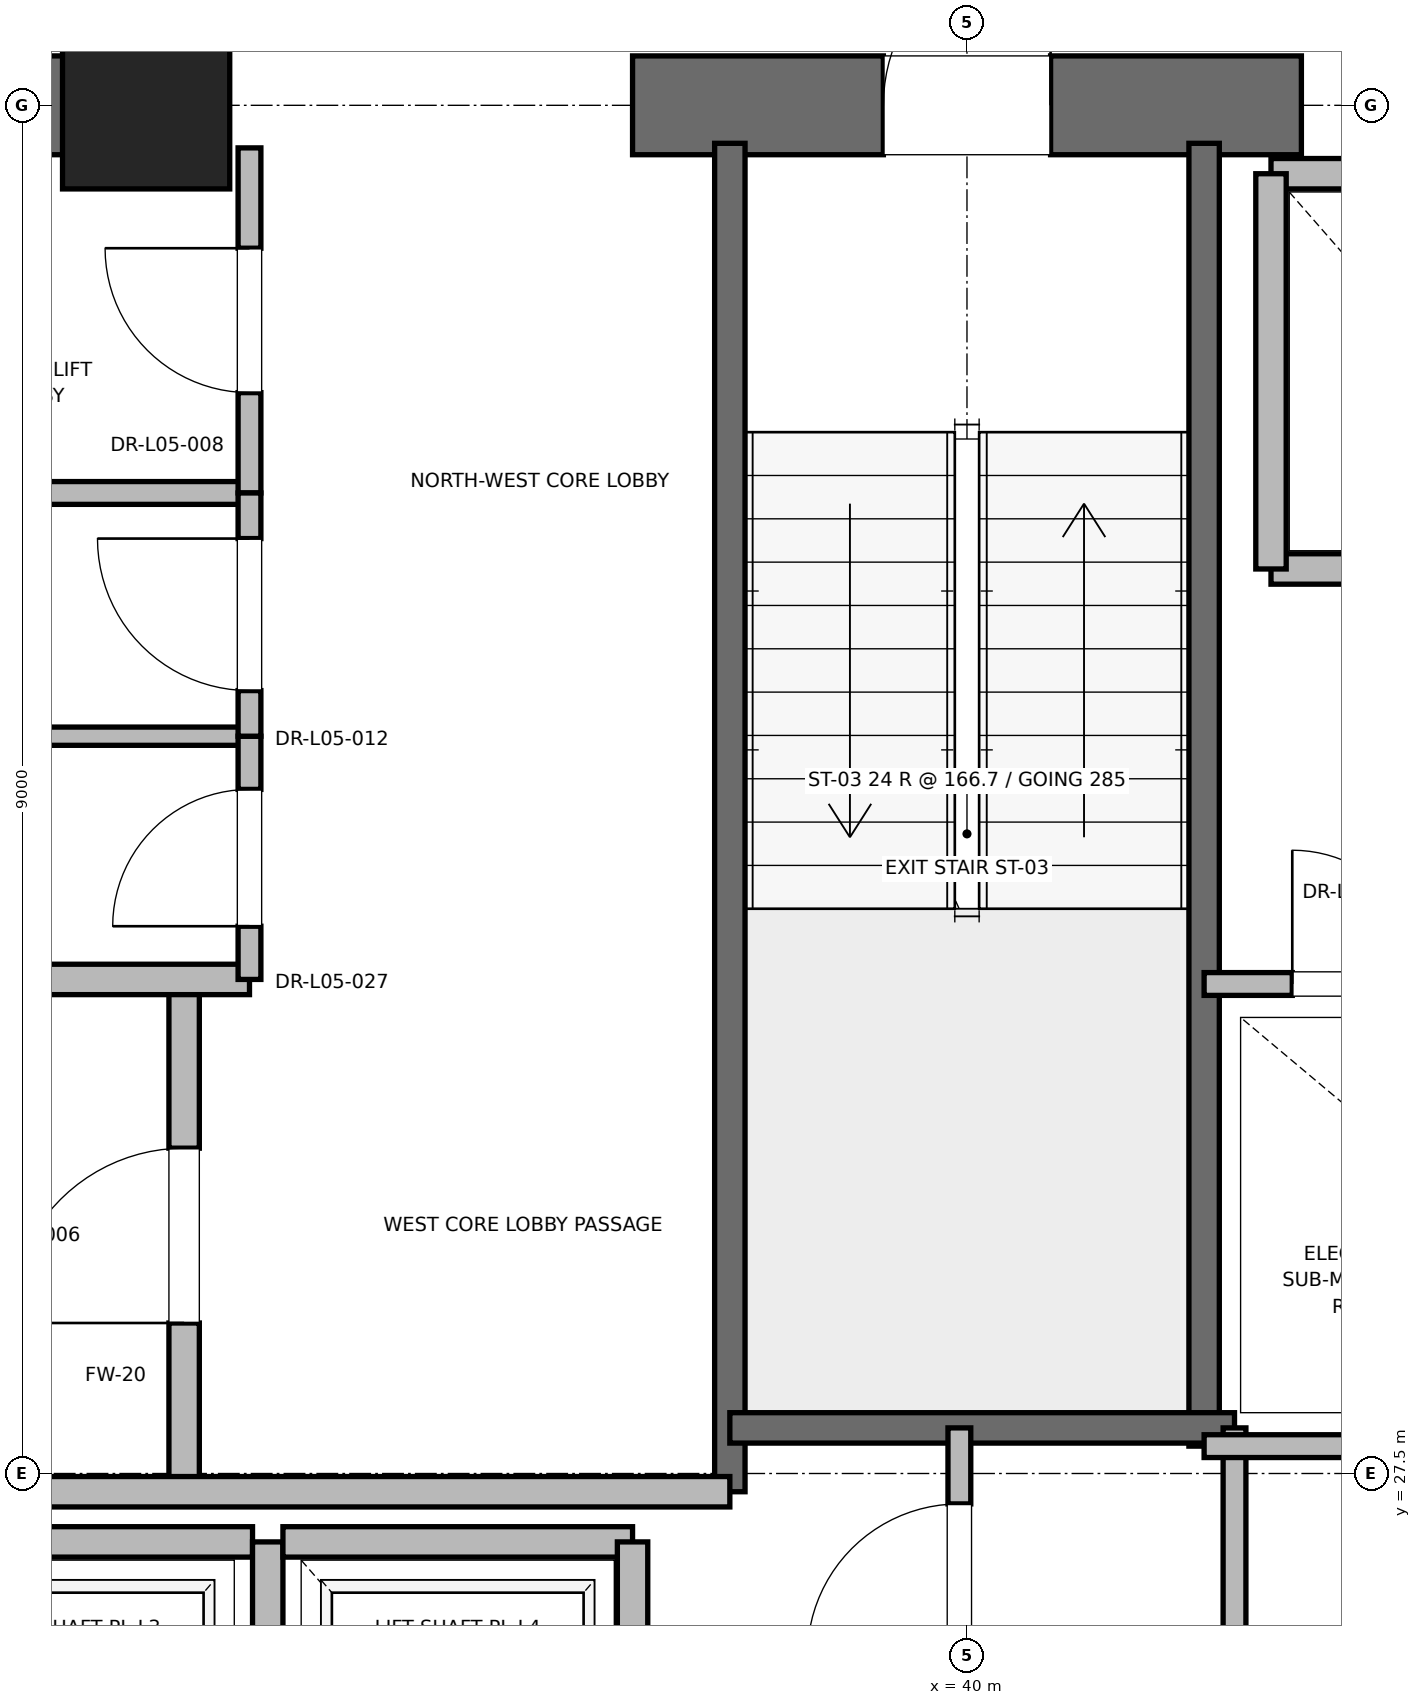
"""IFC4 building model, lengths in metres.
Left out: names, types, materials, properties, quantities, classifications, styles, units other than length and angle.
Written with IfcOpenShell. Run it as: python <this file> out.ifc"""

import sys

from ifc_helpers import new_model, si_unit, direction, frame, frame_2d, origin, origin_2d, place, context, subcontext, project, spatial, rectangle, extrude, element, fill, save


model = new_model("IFC4")
c1 = context("Model", 3, precision=1e-05, world=origin(), true_north=direction((0.0, 1.0)))
c2 = subcontext(c1, "Body", "Model", "MODEL_VIEW")
j1 = project(units=[si_unit("LENGTHUNIT", "METRE"), si_unit("PLANEANGLEUNIT", "RADIAN")], contexts=[c1])
p1 = place(None, origin())
s1 = spatial("IfcSite", under=j1, at=p1, CompositionType="ELEMENT")
p2 = place(p1, origin())
s2 = spatial("IfcBuilding", under=s1, at=p2, CompositionType="ELEMENT")
p3 = place(p2, frame((0.0, 0.0, 27.6)))
s3 = spatial("IfcBuildingStorey", under=s2, at=p3, CompositionType="ELEMENT", Elevation=27.6)
p4 = place(p3, frame((34.6, 36.5, 0.0), z_axis=(0.0, 0.0, 1.0), x_axis=(1.0, 0.0, 0.0)))
e1 = element("IfcColumn", 1, at=p4, inside=s3, PredefinedType="PILASTER", context=c2, shape_type="SweptSolid", body=[
    extrude(rectangle(XDim=1.1, YDim=1.1, at=origin_2d()), origin(), (0.0, 0.0, 1.0), 4.0),
])
p5 = place(p3, frame((29.0, 36.5, 0.0), z_axis=(0.0, 0.0, 1.0), x_axis=(1.0, 0.0, 0.0)))
e2 = element("IfcWall", 2, at=p5, inside=s3, PredefinedType="SHEAR", context=c2, shape_type="SweptSolid", body=[
    extrude(rectangle(XDim=5.8, YDim=0.65, at=frame_2d((2.9, 0.0))), origin(), (0.0, 0.0, 1.0), 3.76),
])
p6 = place(p3, frame((37.8, 36.5, 0.0), z_axis=(0.0, 0.0, 1.0), x_axis=(1.0, 0.0, 0.0)))
e3 = element("IfcWall", 3, at=p6, inside=s3, PredefinedType="SHEAR", context=c2, shape_type="SweptSolid", body=[
    extrude(rectangle(XDim=4.4, YDim=0.65, at=frame_2d((2.2, 0.0))), origin(), (0.0, 0.0, 1.0), 3.76),
])
p7 = place(p6, frame((1.65, 0.0, 0.0)))
e4 = element("IfcOpeningElement", 4, at=p7, cuts=e3, PredefinedType="OPENING", context=c2, shape_type="SweptSolid", body=[
    extrude(rectangle(XDim=1.1, YDim=2.15, at=frame_2d((0.55, 1.075))), frame((0.0, 0.325, 0.0), z_axis=(0.0, -1.0, 0.0), x_axis=(1.0, 0.0, 0.0)), (0.0, 0.0, 1.0), 0.65),
])
p8 = place(p3, frame((38.44, 27.38, 0.0), z_axis=(0.0, 0.0, 1.0), x_axis=(0.0, 1.0, 0.0)))
e5 = element("IfcWall", 5, at=p8, inside=s3, PredefinedType="SOLIDWALL", context=c2, shape_type="SweptSolid", body=[
    extrude(rectangle(XDim=8.87, YDim=0.2, at=frame_2d((4.435, 0.0))), origin(), (0.0, 0.0, 1.0), 3.76),
])
p9 = place(p3, frame((41.56, 27.68, 0.0), z_axis=(0.0, 0.0, 1.0), x_axis=(0.0, 1.0, 0.0)))
e6 = element("IfcWall", 6, at=p9, inside=s3, PredefinedType="SOLIDWALL", context=c2, shape_type="SweptSolid", body=[
    extrude(rectangle(XDim=8.57, YDim=0.2, at=frame_2d((4.285, 0.0))), origin(), (0.0, 0.0, 1.0), 3.76),
])
p10 = place(p3, frame((38.44, 27.8, 0.0), z_axis=(0.0, 0.0, 1.0), x_axis=(1.0, 0.0, 0.0)))
e7 = element("IfcWall", 7, at=p10, inside=s3, PredefinedType="SOLIDWALL", context=c2, shape_type="SweptSolid", body=[
    extrude(rectangle(XDim=3.32, YDim=0.2, at=frame_2d((1.66, 0.0))), origin(), (0.0, 0.0, 1.0), 3.76),
])
p11 = place(p3, frame((34.85, 27.38, 0.0), z_axis=(0.0, 0.0, 1.0), x_axis=(0.0, 1.0, 0.0)))
e8 = element("IfcWall", 8, at=p11, inside=s3, PredefinedType="PARTITIONING", context=c2, shape_type="SweptSolid", body=[
    extrude(rectangle(XDim=3.37, YDim=0.2, at=frame_2d((1.685, 0.0))), origin(), (0.0, 0.0, 1.0), 3.76),
])
p12 = place(p11, frame((1.11, 0.0, 0.0)))
e9 = element("IfcOpeningElement", 9, at=p12, cuts=e8, PredefinedType="OPENING", context=c2, shape_type="SweptSolid", body=[
    extrude(rectangle(XDim=1.15, YDim=2.2, at=frame_2d((0.575, 1.1))), frame((0.0, 0.1, 0.0), z_axis=(0.0, -1.0, 0.0), x_axis=(1.0, 0.0, 0.0)), (0.0, 0.0, 1.0), 0.2),
])
p13 = place(p3, frame((32.82, 27.38, 0.0), z_axis=(0.0, 0.0, 1.0), x_axis=(1.0, 0.0, 0.0)))
e10 = element("IfcWall", 10, at=p13, inside=s3, PredefinedType="PARTITIONING", context=c2, shape_type="SweptSolid", body=[
    extrude(rectangle(XDim=5.62, YDim=0.2, at=frame_2d((2.81, 0.0))), origin(), (0.0, 0.0, 1.0), 3.76),
])
p14 = place(p3, frame((32.15, 30.75, 0.0), z_axis=(0.0, 0.0, 1.0), x_axis=(1.0, 0.0, 0.0)))
e11 = element("IfcWall", 11, at=p14, inside=s3, PredefinedType="PARTITIONING", context=c2, shape_type="SweptSolid", body=[
    extrude(rectangle(XDim=3.13, YDim=0.2, at=frame_2d((1.565, 0.0))), origin(), (0.0, 0.0, 1.0), 3.76),
])
p15 = place(p3, frame((35.3, 27.05, 0.0), z_axis=(0.0, 0.0, 1.0), x_axis=(-1.0, 0.0, 0.0)))
e12 = element("IfcWall", 12, at=p15, inside=s3, PredefinedType="SOLIDWALL", context=c2, shape_type="SweptSolid", body=[
    extrude(rectangle(XDim=2.3, YDim=0.2, at=frame_2d((1.15, 0.0))), origin(), (0.0, 0.0, 1.0), 3.76),
])
p16 = place(p3, frame((35.4, 24.45, 0.0), z_axis=(0.0, 0.0, 1.0), x_axis=(0.0, 1.0, 0.0)))
e13 = element("IfcWall", 13, at=p16, inside=s3, PredefinedType="SOLIDWALL", context=c2, shape_type="SweptSolid", body=[
    extrude(rectangle(XDim=2.6, YDim=0.2, at=frame_2d((1.3, 0.0))), origin(), (0.0, 0.0, 1.0), 3.76),
])
p17 = place(p3, frame((37.8, 27.05, 0.0), z_axis=(0.0, 0.0, 1.0), x_axis=(-1.0, 0.0, 0.0)))
e14 = element("IfcWall", 14, at=p17, inside=s3, PredefinedType="SOLIDWALL", context=c2, shape_type="SweptSolid", body=[
    extrude(rectangle(XDim=2.3, YDim=0.2, at=frame_2d((1.15, 0.0))), origin(), (0.0, 0.0, 1.0), 3.76),
])
p18 = place(p3, frame((37.8, 24.45, 0.0), z_axis=(0.0, 0.0, 1.0), x_axis=(0.0, 1.0, 0.0)))
e15 = element("IfcWall", 15, at=p18, inside=s3, PredefinedType="SOLIDWALL", context=c2, shape_type="SweptSolid", body=[
    extrude(rectangle(XDim=2.6, YDim=0.2, at=frame_2d((1.3, 0.0))), origin(), (0.0, 0.0, 1.0), 3.76),
])
p19 = place(p3, frame((42.0, 33.45, 0.0), z_axis=(0.0, 0.0, 1.0), x_axis=(1.0, 0.0, 0.0)))
e16 = element("IfcWall", 16, at=p19, inside=s3, PredefinedType="SOLIDWALL", context=c2, shape_type="SweptSolid", body=[
    extrude(rectangle(XDim=2.3, YDim=0.2, at=frame_2d((1.15, 0.0))), origin(), (0.0, 0.0, 1.0), 3.76),
])
p20 = place(p3, frame((44.3, 36.05, 0.0), z_axis=(0.0, 0.0, 1.0), x_axis=(-1.0, 0.0, 0.0)))
e17 = element("IfcWall", 17, at=p20, inside=s3, PredefinedType="SOLIDWALL", context=c2, shape_type="SweptSolid", body=[
    extrude(rectangle(XDim=2.3, YDim=0.2, at=frame_2d((1.15, 0.0))), origin(), (0.0, 0.0, 1.0), 2.54),
])
p21 = place(p3, frame((42.0, 36.05, 0.0), z_axis=(0.0, 0.0, 1.0), x_axis=(0.0, -1.0, 0.0)))
e18 = element("IfcWall", 18, at=p21, inside=s3, PredefinedType="SOLIDWALL", context=c2, shape_type="SweptSolid", body=[
    extrude(rectangle(XDim=2.6, YDim=0.2, at=frame_2d((1.3, 0.0))), origin(), (0.0, 0.0, 1.0), 2.54),
])
p22 = place(p3, frame((41.76, 23.8, 0.0), z_axis=(0.0, 0.0, 1.0), x_axis=(0.0, 1.0, 0.0)))
e19 = element("IfcWall", 19, at=p22, inside=s3, PredefinedType="PARTITIONING", context=c2, shape_type="SweptSolid", body=[
    extrude(rectangle(XDim=4.0, YDim=0.15, at=frame_2d((2.0, 0.0))), origin(), (0.0, 0.0, 1.0), 2.85),
])
p23 = place(p3, frame((39.95, 25.8, 0.0), z_axis=(0.0, 0.0, 1.0), x_axis=(0.0, 1.0, 0.0)))
e20 = element("IfcWall", 20, at=p23, inside=s3, PredefinedType="PARTITIONING", context=c2, shape_type="SweptSolid", body=[
    extrude(rectangle(XDim=2.0, YDim=0.15, at=frame_2d((1.0, 0.0))), origin(), (0.0, 0.0, 1.0), 2.85),
])
p24 = place(p23, frame((0.5, 0.0, 0.0)))
e21 = element("IfcOpeningElement", 21, at=p24, cuts=e20, PredefinedType="OPENING", context=c2, shape_type="SweptSolid", body=[
    extrude(rectangle(XDim=1.0, YDim=2.15, at=frame_2d((0.5, 1.075))), frame((0.0, 0.075, 0.0), z_axis=(0.0, -1.0, 0.0), x_axis=(1.0, 0.0, 0.0)), (0.0, 0.0, 1.0), 0.15),
])
p25 = place(p3, frame((32.15, 33.95, 0.0), z_axis=(0.0, 0.0, 1.0), x_axis=(1.0, 0.0, 0.0)))
e22 = element("IfcWall", 22, at=p25, inside=s3, PredefinedType="PARTITIONING", context=c2, shape_type="SweptSolid", body=[
    extrude(rectangle(XDim=3.13, YDim=0.15, at=frame_2d((1.565, 0.0))), origin(), (0.0, 0.0, 1.0), 2.85),
])
p26 = place(p3, frame((35.28, 33.95, 0.0), z_axis=(0.0, 0.0, 1.0), x_axis=(0.0, 1.0, 0.0)))
e23 = element("IfcWall", 23, at=p26, inside=s3, PredefinedType="PARTITIONING", context=c2, shape_type="SweptSolid", body=[
    extrude(rectangle(XDim=2.27, YDim=0.15, at=frame_2d((1.135, 0.0))), origin(), (0.0, 0.0, 1.0), 2.54),
])
p27 = place(p26, frame((0.66, 0.0, 0.0)))
e24 = element("IfcOpeningElement", 24, at=p27, cuts=e23, PredefinedType="OPENING", context=c2, shape_type="SweptSolid", body=[
    extrude(rectangle(XDim=0.95, YDim=2.15, at=frame_2d((0.475, 1.075))), frame((0.0, 0.075, 0.0), z_axis=(0.0, -1.0, 0.0), x_axis=(1.0, 0.0, 0.0)), (0.0, 0.0, 1.0), 0.15),
])
p28 = place(p3, frame((32.15, 32.35, 0.0), z_axis=(0.0, 0.0, 1.0), x_axis=(1.0, 0.0, 0.0)))
e25 = element("IfcWall", 25, at=p28, inside=s3, PredefinedType="PARTITIONING", context=c2, shape_type="SweptSolid", body=[
    extrude(rectangle(XDim=3.13, YDim=0.12, at=frame_2d((1.565, 0.0))), origin(), (0.0, 0.0, 1.0), 2.85),
])
p29 = place(p3, frame((35.28, 30.75, 0.0), z_axis=(0.0, 0.0, 1.0), x_axis=(0.0, 1.0, 0.0)))
e26 = element("IfcWall", 26, at=p29, inside=s3, PredefinedType="PARTITIONING", context=c2, shape_type="SweptSolid", body=[
    extrude(rectangle(XDim=1.6, YDim=0.15, at=frame_2d((0.8, 0.0))), origin(), (0.0, 0.0, 1.0), 2.85),
])
p30 = place(p29, frame((0.35, 0.0, 0.0)))
e27 = element("IfcOpeningElement", 27, at=p30, cuts=e26, PredefinedType="OPENING", context=c2, shape_type="SweptSolid", body=[
    extrude(rectangle(XDim=0.9, YDim=2.1, at=frame_2d((0.45, 1.05))), frame((0.0, 0.075, 0.0), z_axis=(0.0, -1.0, 0.0), x_axis=(1.0, 0.0, 0.0)), (0.0, 0.0, 1.0), 0.15),
])
p31 = place(p3, frame((35.28, 32.35, 0.0), z_axis=(0.0, 0.0, 1.0), x_axis=(0.0, 1.0, 0.0)))
e28 = element("IfcWall", 28, at=p31, inside=s3, PredefinedType="PARTITIONING", context=c2, shape_type="SweptSolid", body=[
    extrude(rectangle(XDim=1.6, YDim=0.15, at=frame_2d((0.8, 0.0))), origin(), (0.0, 0.0, 1.0), 2.85),
])
p32 = place(p31, frame((0.3, 0.0, 0.0)))
e29 = element("IfcOpeningElement", 29, at=p32, cuts=e28, PredefinedType="OPENING", context=c2, shape_type="SweptSolid", body=[
    extrude(rectangle(XDim=1.0, YDim=2.15, at=frame_2d((0.5, 1.075))), frame((0.0, 0.075, 0.0), z_axis=(0.0, -1.0, 0.0), x_axis=(1.0, 0.0, 0.0)), (0.0, 0.0, 1.0), 0.15),
])
p33 = place(p3, frame((41.56, 27.68, 0.0), z_axis=(0.0, 0.0, 1.0), x_axis=(1.0, 0.0, 0.0)))
e30 = element("IfcWall", 30, at=p33, inside=s3, PredefinedType="PARTITIONING", context=c2, shape_type="SweptSolid", body=[
    extrude(rectangle(XDim=3.59, YDim=0.15, at=frame_2d((1.795, 0.0))), origin(), (0.0, 0.0, 1.0), 2.85),
])
p34 = place(p3, frame((41.56, 30.72, 0.0), z_axis=(0.0, 0.0, 1.0), x_axis=(1.0, 0.0, 0.0)))
e31 = element("IfcWall", 31, at=p34, inside=s3, PredefinedType="PARTITIONING", context=c2, shape_type="SweptSolid", body=[
    extrude(rectangle(XDim=2.04, YDim=0.15, at=frame_2d((1.02, 0.0))), origin(), (0.0, 0.0, 1.0), 2.85),
])
p35 = place(p34, frame((0.58, 0.0, 0.0)))
e32 = element("IfcOpeningElement", 32, at=p35, cuts=e31, PredefinedType="OPENING", context=c2, shape_type="SweptSolid", body=[
    extrude(rectangle(XDim=0.88, YDim=2.1, at=frame_2d((0.44, 1.05))), frame((0.0, 0.075, 0.0), z_axis=(0.0, -1.0, 0.0), x_axis=(1.0, 0.0, 0.0)), (0.0, 0.0, 1.0), 0.15),
])
p36 = place(p7, origin())
e33 = element("IfcDoor", 33, at=p36, inside=s3, OperationType="SINGLE_SWING_RIGHT", PredefinedType="DOOR", context=c2, shape_type="SweptSolid", body=[
    extrude(rectangle(XDim=1.1, YDim=2.15, at=frame_2d((0.55, 1.075))), frame((0.0, 0.025, 0.0), z_axis=(0.0, -1.0, 0.0), x_axis=(1.0, 0.0, 0.0)), (0.0, 0.0, 1.0), 0.05),
])
fill(e4, e33)
p37 = place(p12, origin())
e34 = element("IfcDoor", 34, at=p37, inside=s3, OperationType="SINGLE_SWING_LEFT", PredefinedType="DOOR", context=c2, shape_type="SweptSolid", body=[
    extrude(rectangle(XDim=1.15, YDim=2.2, at=frame_2d((0.575, 1.1))), frame((0.0, 0.025, 0.0), z_axis=(0.0, -1.0, 0.0), x_axis=(1.0, 0.0, 0.0)), (0.0, 0.0, 1.0), 0.05),
])
fill(e9, e34)
p38 = place(p24, origin())
e35 = element("IfcDoor", 35, at=p38, inside=s3, OperationType="SINGLE_SWING_LEFT", PredefinedType="DOOR", context=c2, shape_type="SweptSolid", body=[
    extrude(rectangle(XDim=1.0, YDim=2.15, at=frame_2d((0.5, 1.075))), frame((0.0, 0.025, 0.0), z_axis=(0.0, -1.0, 0.0), x_axis=(1.0, 0.0, 0.0)), (0.0, 0.0, 1.0), 0.05),
])
fill(e21, e35)
p39 = place(p27, origin())
e36 = element("IfcDoor", 36, at=p39, inside=s3, OperationType="SINGLE_SWING_RIGHT", PredefinedType="DOOR", context=c2, shape_type="SweptSolid", body=[
    extrude(rectangle(XDim=0.95, YDim=2.15, at=frame_2d((0.475, 1.075))), frame((0.0, 0.025, 0.0), z_axis=(0.0, -1.0, 0.0), x_axis=(1.0, 0.0, 0.0)), (0.0, 0.0, 1.0), 0.05),
])
fill(e24, e36)
p40 = place(p30, origin())
e37 = element("IfcDoor", 37, at=p40, inside=s3, OperationType="SINGLE_SWING_LEFT", PredefinedType="DOOR", context=c2, shape_type="SweptSolid", body=[
    extrude(rectangle(XDim=0.9, YDim=2.1, at=frame_2d((0.45, 1.05))), frame((0.0, 0.025, 0.0), z_axis=(0.0, -1.0, 0.0), x_axis=(1.0, 0.0, 0.0)), (0.0, 0.0, 1.0), 0.05),
])
fill(e27, e37)
p41 = place(p32, origin())
e38 = element("IfcDoor", 38, at=p41, inside=s3, OperationType="SINGLE_SWING_RIGHT", PredefinedType="DOOR", context=c2, shape_type="SweptSolid", body=[
    extrude(rectangle(XDim=1.0, YDim=2.15, at=frame_2d((0.5, 1.075))), frame((0.0, 0.025, 0.0), z_axis=(0.0, -1.0, 0.0), x_axis=(1.0, 0.0, 0.0)), (0.0, 0.0, 1.0), 0.05),
])
fill(e29, e38)
p42 = place(p35, origin())
e39 = element("IfcDoor", 39, at=p42, inside=s3, OperationType="SINGLE_SWING_LEFT", PredefinedType="DOOR", context=c2, shape_type="SweptSolid", body=[
    extrude(rectangle(XDim=0.88, YDim=2.1, at=frame_2d((0.44, 1.05))), frame((0.0, 0.025, 0.0), z_axis=(0.0, -1.0, 0.0), x_axis=(1.0, 0.0, 0.0)), (0.0, 0.0, 1.0), 0.05),
])
fill(e32, e39)
save(model, sys.argv[1])
